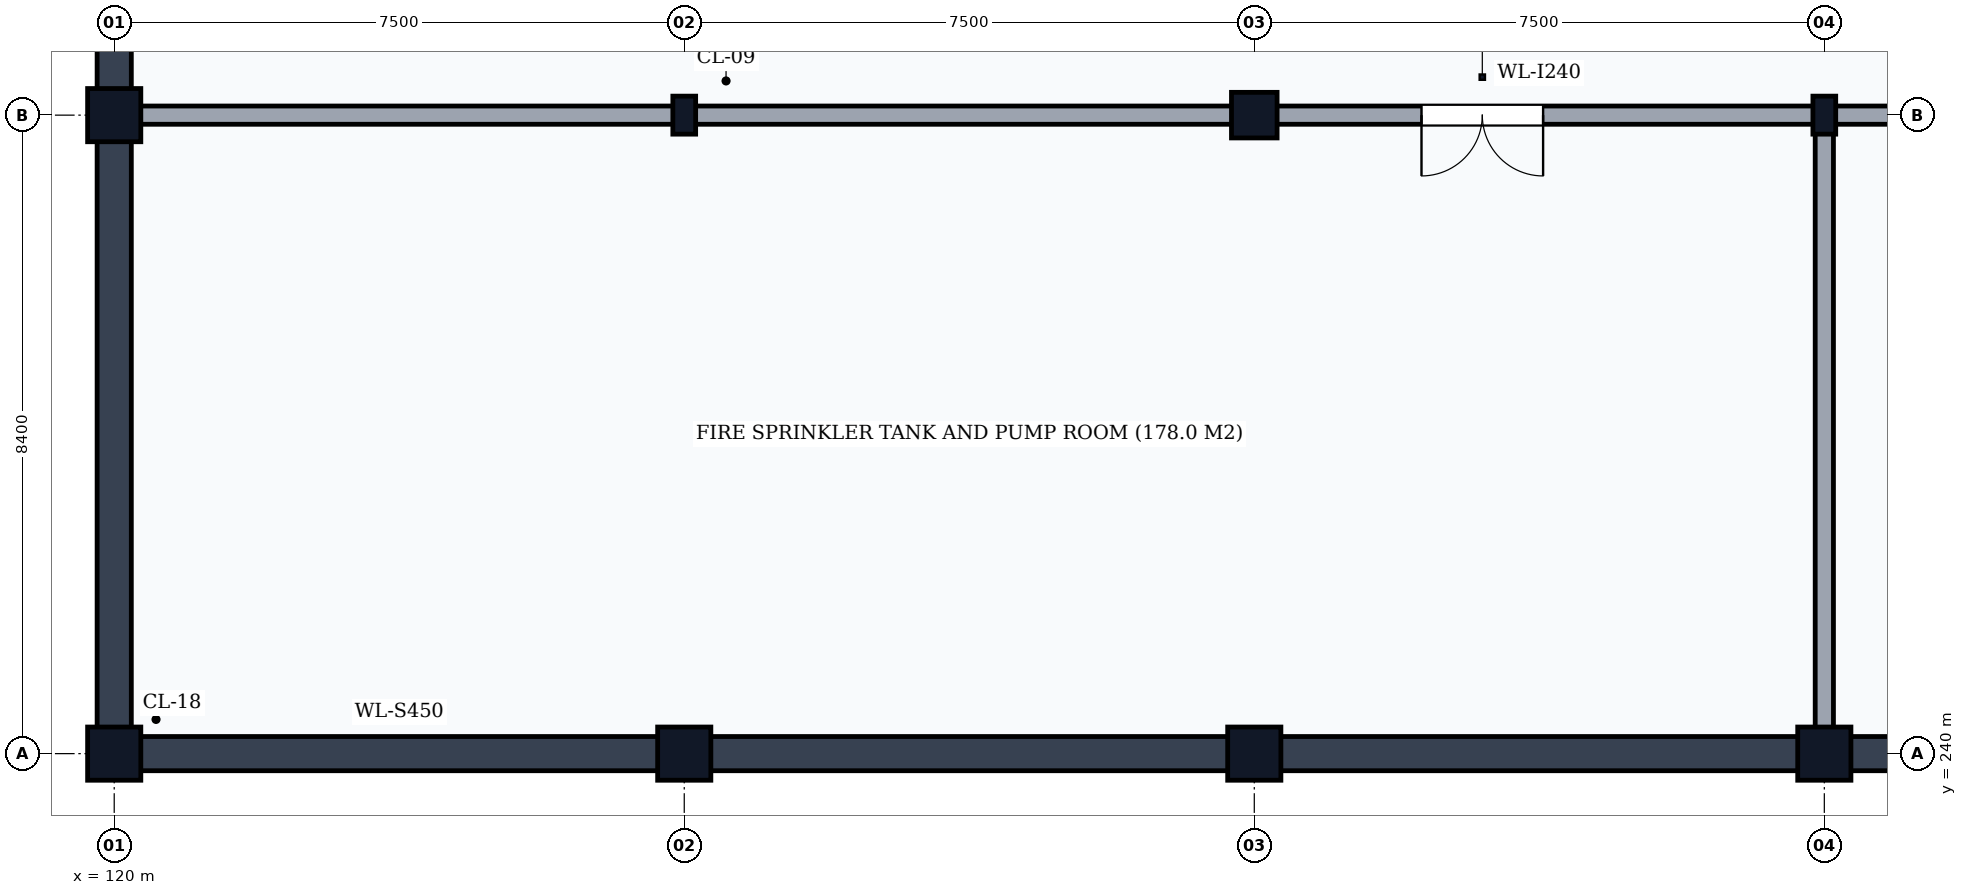
"""IFC4 building model, lengths in metres.
Left out: names, types, materials, properties, quantities, classifications, styles, units other than length and angle.
Written with IfcOpenShell. Run it as: python <this file> out.ifc"""

import sys

from ifc_helpers import new_model, si_unit, direction, frame, frame_2d, origin, origin_2d, place, context, subcontext, project, spatial, rectangle, i_section, extrude, element, fill, save


model = new_model("IFC4")
c1 = context("Model", 3, precision=1e-05, world=origin(), true_north=direction((0.0, 1.0)))
c2 = subcontext(c1, "Body", "Model", "MODEL_VIEW")
j1 = project(units=[si_unit("LENGTHUNIT", "METRE"), si_unit("PLANEANGLEUNIT", "RADIAN")], contexts=[c1])
p1 = place(None, origin())
s1 = spatial("IfcSite", under=j1, at=p1, CompositionType="ELEMENT")
p2 = place(p1, origin())
s2 = spatial("IfcBuilding", under=s1, at=p2, CompositionType="ELEMENT")
p3 = place(p2, frame((0.0, 0.0, -4.8)))
s3 = spatial("IfcBuildingStorey", under=s2, at=p3, CompositionType="ELEMENT", Elevation=-4.8)
for number, where, z_axis, x_axis in (
    (1, (120.0, 240.0, 0.0), (0.0, 0.0, 1.0), (1.0, 0.0, 0.0)),
    (2, (120.0, 248.4, 0.0), (0.0, 0.0, 1.0), (1.0, 0.0, 0.0)),
    (3, (127.5, 240.0, 0.0), (0.0, 0.0, 1.0), (1.0, 0.0, 0.0)),
):
    element("IfcColumn", number, at=place(p3, frame(where, z_axis=z_axis, x_axis=x_axis)), inside=s3, PredefinedType="COLUMN", context=c2, shape_type="SweptSolid", body=[
        extrude(rectangle(XDim=0.7, YDim=0.7, at=origin_2d()), origin(), (0.0, 0.0, 1.0), 4.8),
    ])
p4 = place(p3, frame((127.5, 248.4, 0.0), z_axis=(0.0, 0.0, 1.0), x_axis=(1.0, 0.0, 0.0)))
e4 = element("IfcColumn", 4, at=p4, inside=s3, PredefinedType="COLUMN", context=c2, shape_type="SweptSolid", body=[
    extrude(i_section(OverallWidth=0.3, OverallDepth=0.5, WebThickness=0.014, FlangeThickness=0.028, FilletRadius=0.027, at=origin_2d()), origin(), (0.0, 0.0, 1.0), 4.8),
])
p5 = place(p3, frame((135.0, 240.0, 0.0), z_axis=(0.0, 0.0, 1.0), x_axis=(1.0, 0.0, 0.0)))
e5 = element("IfcColumn", 5, at=p5, inside=s3, PredefinedType="COLUMN", context=c2, shape_type="SweptSolid", body=[
    extrude(rectangle(XDim=0.7, YDim=0.7, at=origin_2d()), origin(), (0.0, 0.0, 1.0), 4.8),
])
p6 = place(p3, frame((135.0, 248.4, 0.0), z_axis=(0.0, 0.0, 1.0), x_axis=(1.0, 0.0, 0.0)))
e6 = element("IfcColumn", 6, at=p6, inside=s3, PredefinedType="COLUMN", context=c2, shape_type="SweptSolid", body=[
    extrude(rectangle(XDim=0.6, YDim=0.6, at=origin_2d()), origin(), (0.0, 0.0, 1.0), 4.8),
])
p7 = place(p3, frame((142.5, 240.0, 0.0), z_axis=(0.0, 0.0, 1.0), x_axis=(1.0, 0.0, 0.0)))
e7 = element("IfcColumn", 7, at=p7, inside=s3, PredefinedType="COLUMN", context=c2, shape_type="SweptSolid", body=[
    extrude(rectangle(XDim=0.7, YDim=0.7, at=origin_2d()), origin(), (0.0, 0.0, 1.0), 4.8),
])
p8 = place(p3, frame((142.5, 248.4, 0.0), z_axis=(0.0, 0.0, 1.0), x_axis=(1.0, 0.0, 0.0)))
e8 = element("IfcColumn", 8, at=p8, inside=s3, PredefinedType="COLUMN", context=c2, shape_type="SweptSolid", body=[
    extrude(i_section(OverallWidth=0.3, OverallDepth=0.5, WebThickness=0.014, FlangeThickness=0.028, FilletRadius=0.027, at=origin_2d()), origin(), (0.0, 0.0, 1.0), 4.8),
])
for number, where, z_axis, x_axis in (
    (9, (120.0, 240.0, 0.0), (0.0, 0.0, 1.0), (1.0, 0.0, 0.0)),
    (10, (127.5, 240.0, 0.0), (0.0, 0.0, 1.0), (1.0, 0.0, 0.0)),
    (11, (135.0, 240.0, 0.0), (0.0, 0.0, 1.0), (1.0, 0.0, 0.0)),
    (12, (142.5, 240.0, 0.0), (0.0, 0.0, 1.0), (1.0, 0.0, 0.0)),
):
    element("IfcWall", number, at=place(p3, frame(where, z_axis=z_axis, x_axis=x_axis)), inside=s3, PredefinedType="SHEAR", context=c2, shape_type="SweptSolid", body=[
        extrude(rectangle(XDim=7.5, YDim=0.45, at=frame_2d((3.75, 0.0))), origin(), (0.0, 0.0, 1.0), 4.51),
    ])
p9 = place(p3, frame((120.0, 240.0, 0.0), z_axis=(0.0, 0.0, 1.0), x_axis=(0.0, 1.0, 0.0)))
e13 = element("IfcWall", 13, at=p9, inside=s3, PredefinedType="SHEAR", context=c2, shape_type="SweptSolid", body=[
    extrude(rectangle(XDim=8.4, YDim=0.45, at=frame_2d((4.2, 0.0))), origin(), (0.0, 0.0, 1.0), 4.51),
])
p10 = place(p3, frame((120.0, 248.4, 0.0), z_axis=(0.0, 0.0, 1.0), x_axis=(0.0, 1.0, 0.0)))
e14 = element("IfcWall", 14, at=p10, inside=s3, PredefinedType="SHEAR", context=c2, shape_type="SweptSolid", body=[
    extrude(rectangle(XDim=6.8, YDim=0.45, at=frame_2d((3.4, 0.0))), origin(), (0.0, 0.0, 1.0), 4.51),
])
p11 = place(p3, frame((120.0, 248.4, 0.0), z_axis=(0.0, 0.0, 1.0), x_axis=(1.0, 0.0, 0.0)))
e15 = element("IfcWall", 15, at=p11, inside=s3, PredefinedType="PARTITIONING", context=c2, shape_type="SweptSolid", body=[
    extrude(rectangle(XDim=37.5, YDim=0.24, at=frame_2d((18.75, 0.0))), origin(), (0.0, 0.0, 1.0), 3.908),
])
p12 = place(p11, frame((17.2, 0.0, 0.0)))
e16 = element("IfcOpeningElement", 16, at=p12, cuts=e15, PredefinedType="OPENING", context=c2, shape_type="SweptSolid", body=[
    extrude(rectangle(XDim=1.6, YDim=2.1, at=frame_2d((0.8, 1.05))), frame((0.0, 0.135, 0.0), z_axis=(0.0, -1.0, 0.0), x_axis=(1.0, 0.0, 0.0)), (0.0, 0.0, 1.0), 0.27),
])
p13 = place(p11, frame((32.2, 0.0, 0.0)))
e17 = element("IfcOpeningElement", 17, at=p13, cuts=e15, PredefinedType="OPENING", context=c2, shape_type="SweptSolid", body=[
    extrude(rectangle(XDim=1.6, YDim=2.1, at=frame_2d((0.8, 1.05))), frame((0.0, 0.135, 0.0), z_axis=(0.0, -1.0, 0.0), x_axis=(1.0, 0.0, 0.0)), (0.0, 0.0, 1.0), 0.27),
])
p14 = place(p3, frame((142.5, 240.0, 0.0), z_axis=(0.0, 0.0, 1.0), x_axis=(0.0, 1.0, 0.0)))
e18 = element("IfcWall", 18, at=p14, inside=s3, PredefinedType="PARTITIONING", context=c2, shape_type="SweptSolid", body=[
    extrude(rectangle(XDim=8.4, YDim=0.24, at=frame_2d((4.2, 0.0))), origin(), (0.0, 0.0, 1.0), 3.858),
])
p15 = place(p12, frame((1.6, 0.0, 0.0), z_axis=(0.0, 0.0, 1.0), x_axis=(-1.0, 0.0, 0.0)))
e19 = element("IfcDoor", 19, at=p15, inside=s3, OperationType="DOUBLE_DOOR_SINGLE_SWING", PredefinedType="DOOR", context=c2, shape_type="SweptSolid", body=[
    extrude(rectangle(XDim=1.6, YDim=2.1, at=frame_2d((0.8, 1.05))), frame((0.0, 0.025, 0.0), z_axis=(0.0, -1.0, 0.0), x_axis=(1.0, 0.0, 0.0)), (0.0, 0.0, 1.0), 0.05),
])
fill(e16, e19)
save(model, sys.argv[1])
